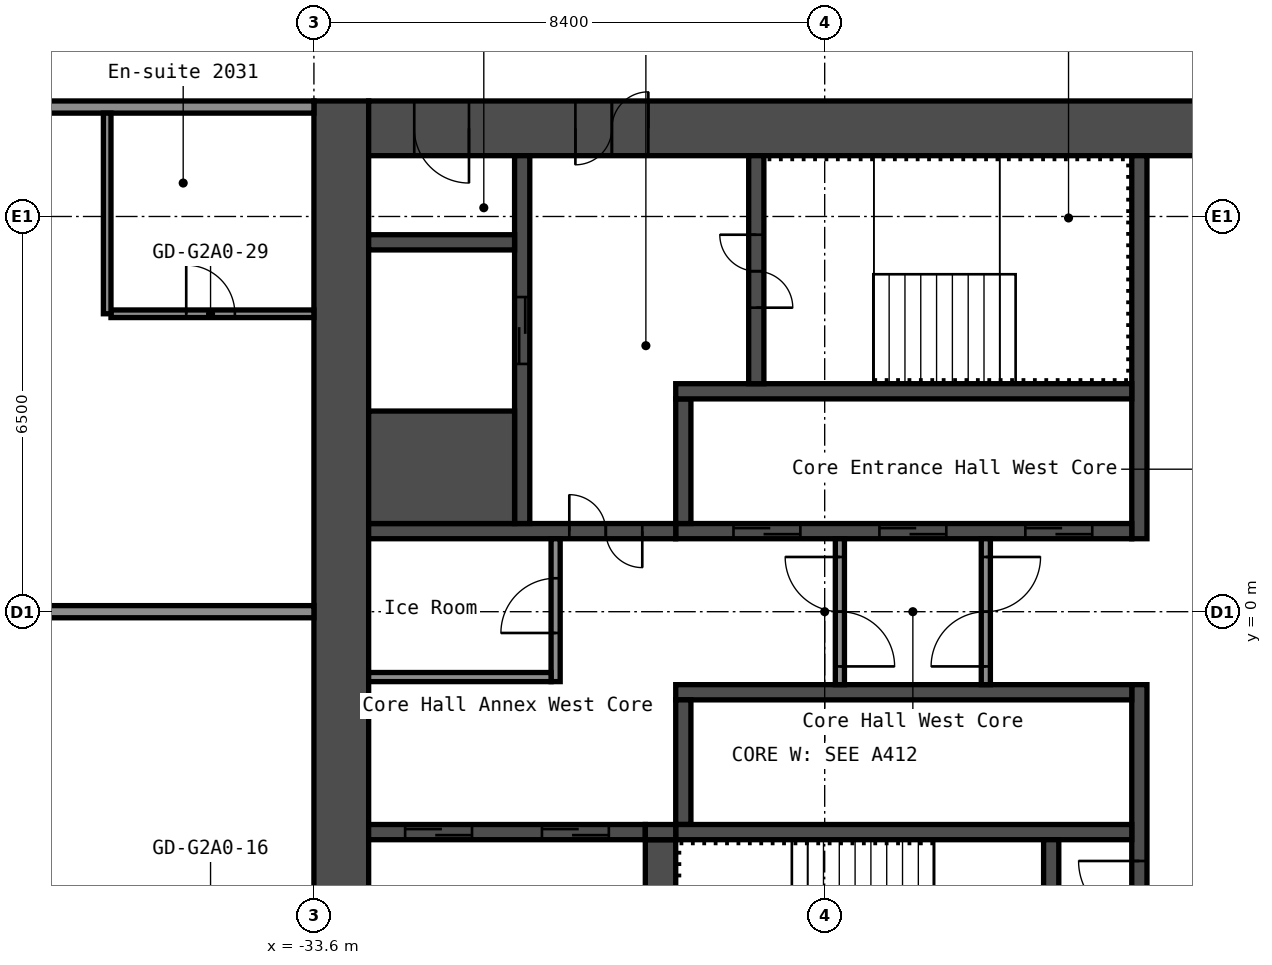
"""IFC4 building model, lengths in metres.
Left out: names, types, materials, properties, quantities, classifications, styles, units other than length and angle.
Written with IfcOpenShell. Run it as: python <this file> out.ifc"""

import sys

from ifc_helpers import new_model, si_unit, direction, frame, frame_2d, origin, place, context, subcontext, project, spatial, rectangle, extrude, element, fill, save


model = new_model("IFC4")
c1 = context("Model", 3, precision=1e-05, world=origin(), true_north=direction((0.0, 1.0)))
c2 = subcontext(c1, "Body", "Model", "MODEL_VIEW")
j1 = project(units=[si_unit("LENGTHUNIT", "METRE"), si_unit("PLANEANGLEUNIT", "RADIAN")], contexts=[c1])
p1 = place(None, origin())
s1 = spatial("IfcSite", under=j1, at=p1, CompositionType="ELEMENT")
p2 = place(p1, origin())
s2 = spatial("IfcBuilding", under=s1, at=p2, CompositionType="ELEMENT")
p3 = place(p2, frame((0.0, 0.0, 75.4)))
s3 = spatial("IfcBuildingStorey", under=s2, at=p3, CompositionType="ELEMENT", Elevation=75.4)
p4 = place(p3, frame((-33.15, -8.4, 0.0), z_axis=(0.0, 0.0, 1.0), x_axis=(0.0, 1.0, 0.0)))
e1 = element("IfcWall", 1, at=p4, inside=s3, PredefinedType="SHEAR", context=c2, shape_type="SweptSolid", body=[
    extrude(rectangle(XDim=16.8, YDim=0.9, at=frame_2d((8.4, 0.0))), origin(), (0.0, 0.0, 1.0), 2.8),
])
p5 = place(p3, frame((-32.7, 7.95, 0.0), z_axis=(0.0, 0.0, 1.0), x_axis=(1.0, 0.0, 0.0)))
e2 = element("IfcWall", 2, at=p5, inside=s3, PredefinedType="SHEAR", context=c2, shape_type="SweptSolid", body=[
    extrude(rectangle(XDim=15.0, YDim=0.9, at=frame_2d((7.5, 0.0))), origin(), (0.0, 0.0, 1.0), 2.8),
])
p6 = place(p5, frame((3.4, 0.0, 0.0)))
e3 = element("IfcOpeningElement", 3, at=p6, cuts=e2, PredefinedType="OPENING", context=c2, shape_type="SweptSolid", body=[
    extrude(rectangle(XDim=1.2, YDim=2.1, at=frame_2d((0.6, 1.05))), frame((0.0, 0.46, 0.0), z_axis=(0.0, -1.0, 0.0), x_axis=(1.0, 0.0, 0.0)), (0.0, 0.0, 1.0), 0.92),
])
p7 = place(p5, frame((0.75, 0.0, 0.0)))
e4 = element("IfcOpeningElement", 4, at=p7, cuts=e2, PredefinedType="OPENING", context=c2, shape_type="SweptSolid", body=[
    extrude(rectangle(XDim=0.9, YDim=2.1, at=frame_2d((0.45, 1.05))), frame((0.0, 0.46, 0.0), z_axis=(0.0, -1.0, 0.0), x_axis=(1.0, 0.0, 0.0)), (0.0, 0.0, 1.0), 0.92),
])
p8 = place(p3, frame((-20.025, 1.2, 0.0), z_axis=(0.0, 0.0, 1.0), x_axis=(0.0, 1.0, 0.0)))
e5 = element("IfcWall", 5, at=p8, inside=s3, PredefinedType="SHEAR", context=c2, shape_type="SweptSolid", body=[
    extrude(rectangle(XDim=6.3, YDim=0.25, at=frame_2d((3.15, 0.0))), origin(), (0.0, 0.0, 1.0), 2.8),
])
p9 = place(p3, frame((-20.025, -7.5, 0.0), z_axis=(0.0, 0.0, 1.0), x_axis=(0.0, 1.0, 0.0)))
e6 = element("IfcWall", 6, at=p9, inside=s3, PredefinedType="SHEAR", context=c2, shape_type="SweptSolid", body=[
    extrude(rectangle(XDim=6.3, YDim=0.25, at=frame_2d((3.15, 0.0))), origin(), (0.0, 0.0, 1.0), 2.8),
])
p10 = place(p9, frame((2.4, 0.0, 0.0)))
e7 = element("IfcOpeningElement", 7, at=p10, cuts=e6, PredefinedType="OPENING", context=c2, shape_type="SweptSolid", body=[
    extrude(rectangle(XDim=1.0, YDim=2.1, at=frame_2d((0.5, 1.05))), frame((0.0, 0.135, 0.0), z_axis=(0.0, -1.0, 0.0), x_axis=(1.0, 0.0, 0.0)), (0.0, 0.0, 1.0), 0.27),
])
p11 = place(p3, frame((-27.65, 1.325, 0.0), z_axis=(0.0, 0.0, 1.0), x_axis=(1.0, 0.0, 0.0)))
e8 = element("IfcWall", 8, at=p11, inside=s3, PredefinedType="SHEAR", context=c2, shape_type="SweptSolid", body=[
    extrude(rectangle(XDim=7.5, YDim=0.25, at=frame_2d((3.75, 0.0))), origin(), (0.0, 0.0, 1.0), 2.8),
])
p12 = place(p11, frame((5.75, 0.0, 0.0)))
e9 = element("IfcOpeningElement", 9, at=p12, cuts=e8, PredefinedType="OPENING", context=c2, shape_type="SweptSolid", body=[
    extrude(rectangle(XDim=1.1, YDim=2.1, at=frame_2d((0.55, 1.05))), frame((0.0, 0.135, 0.0), z_axis=(0.0, -1.0, 0.0), x_axis=(1.0, 0.0, 0.0)), (0.0, 0.0, 1.0), 0.27),
])
p13 = place(p11, frame((3.35, 0.0, 0.0)))
e10 = element("IfcOpeningElement", 10, at=p13, cuts=e8, PredefinedType="OPENING", context=c2, shape_type="SweptSolid", body=[
    extrude(rectangle(XDim=1.1, YDim=2.1, at=frame_2d((0.55, 1.05))), frame((0.0, 0.135, 0.0), z_axis=(0.0, -1.0, 0.0), x_axis=(1.0, 0.0, 0.0)), (0.0, 0.0, 1.0), 0.27),
])
p14 = place(p11, frame((0.95, 0.0, 0.0)))
e11 = element("IfcOpeningElement", 11, at=p14, cuts=e8, PredefinedType="OPENING", context=c2, shape_type="SweptSolid", body=[
    extrude(rectangle(XDim=1.1, YDim=2.1, at=frame_2d((0.55, 1.05))), frame((0.0, 0.135, 0.0), z_axis=(0.0, -1.0, 0.0), x_axis=(1.0, 0.0, 0.0)), (0.0, 0.0, 1.0), 0.27),
])
p15 = place(p3, frame((-27.525, 1.45, 0.0), z_axis=(0.0, 0.0, 1.0), x_axis=(0.0, 1.0, 0.0)))
e12 = element("IfcWall", 12, at=p15, inside=s3, PredefinedType="SHEAR", context=c2, shape_type="SweptSolid", body=[
    extrude(rectangle(XDim=2.05, YDim=0.25, at=frame_2d((1.025, 0.0))), origin(), (0.0, 0.0, 1.0), 2.8),
])
p16 = place(p3, frame((-27.65, 3.625, 0.0), z_axis=(0.0, 0.0, 1.0), x_axis=(1.0, 0.0, 0.0)))
e13 = element("IfcWall", 13, at=p16, inside=s3, PredefinedType="SHEAR", context=c2, shape_type="SweptSolid", body=[
    extrude(rectangle(XDim=7.5, YDim=0.25, at=frame_2d((3.75, 0.0))), origin(), (0.0, 0.0, 1.0), 2.8),
])
p17 = place(p3, frame((-26.325, 3.75, 0.0), z_axis=(0.0, 0.0, 1.0), x_axis=(0.0, 1.0, 0.0)))
e14 = element("IfcWall", 14, at=p17, inside=s3, PredefinedType="SHEAR", context=c2, shape_type="SweptSolid", body=[
    extrude(rectangle(XDim=3.75, YDim=0.25, at=frame_2d((1.875, 0.0))), origin(), (0.0, 0.0, 1.0), 2.8),
])
p18 = place(p17, frame((1.25, 0.0, 0.0)))
e15 = element("IfcOpeningElement", 15, at=p18, cuts=e14, PredefinedType="OPENING", context=c2, shape_type="SweptSolid", body=[
    extrude(rectangle(XDim=1.2, YDim=2.1, at=frame_2d((0.6, 1.05))), frame((0.0, 0.135, 0.0), z_axis=(0.0, -1.0, 0.0), x_axis=(1.0, 0.0, 0.0)), (0.0, 0.0, 1.0), 0.27),
])
p19 = place(p3, frame((-32.7, 1.325, 0.0), z_axis=(0.0, 0.0, 1.0), x_axis=(1.0, 0.0, 0.0)))
e16 = element("IfcWall", 16, at=p19, inside=s3, PredefinedType="SHEAR", context=c2, shape_type="SweptSolid", body=[
    extrude(rectangle(XDim=5.05, YDim=0.25, at=frame_2d((2.525, 0.0))), origin(), (0.0, 0.0, 1.0), 2.8),
])
p20 = place(p19, frame((3.3, 0.0, 0.0)))
e17 = element("IfcOpeningElement", 17, at=p20, cuts=e16, PredefinedType="OPENING", context=c2, shape_type="SweptSolid", body=[
    extrude(rectangle(XDim=1.2, YDim=2.1, at=frame_2d((0.6, 1.05))), frame((0.0, 0.135, 0.0), z_axis=(0.0, -1.0, 0.0), x_axis=(1.0, 0.0, 0.0)), (0.0, 0.0, 1.0), 0.27),
])
p21 = place(p3, frame((-30.175, 1.45, 0.0), z_axis=(0.0, 0.0, 1.0), x_axis=(0.0, 1.0, 0.0)))
e18 = element("IfcWall", 18, at=p21, inside=s3, PredefinedType="SHEAR", context=c2, shape_type="SweptSolid", body=[
    extrude(rectangle(XDim=6.05, YDim=0.25, at=frame_2d((3.025, 0.0))), origin(), (0.0, 0.0, 1.0), 2.8),
])
p22 = place(p21, frame((2.625, 0.0, 0.0)))
e19 = element("IfcOpeningElement", 19, at=p22, cuts=e18, PredefinedType="OPENING", context=c2, shape_type="SweptSolid", body=[
    extrude(rectangle(XDim=1.1, YDim=2.1, at=frame_2d((0.55, 1.05))), frame((0.0, 0.135, 0.0), z_axis=(0.0, -1.0, 0.0), x_axis=(1.0, 0.0, 0.0)), (0.0, 0.0, 1.0), 0.27),
])
p23 = place(p3, frame((-32.7, 2.375, 0.0), z_axis=(0.0, 0.0, 1.0), x_axis=(1.0, 0.0, 0.0)))
e20 = element("IfcWall", 20, at=p23, inside=s3, PredefinedType="SHEAR", context=c2, shape_type="SweptSolid", body=[
    extrude(rectangle(XDim=2.4, YDim=1.85, at=frame_2d((1.2, 0.0))), origin(), (0.0, 0.0, 1.0), 2.8),
])
p24 = place(p3, frame((-32.7, 6.075, 0.0), z_axis=(0.0, 0.0, 1.0), x_axis=(1.0, 0.0, 0.0)))
e21 = element("IfcWall", 21, at=p24, inside=s3, PredefinedType="SHEAR", context=c2, shape_type="SweptSolid", body=[
    extrude(rectangle(XDim=2.4, YDim=0.25, at=frame_2d((1.2, 0.0))), origin(), (0.0, 0.0, 1.0), 2.8),
])
p25 = place(p3, frame((-27.65, -1.325, 0.0), z_axis=(0.0, 0.0, 1.0), x_axis=(1.0, 0.0, 0.0)))
e22 = element("IfcWall", 22, at=p25, inside=s3, PredefinedType="SHEAR", context=c2, shape_type="SweptSolid", body=[
    extrude(rectangle(XDim=7.5, YDim=0.25, at=frame_2d((3.75, 0.0))), origin(), (0.0, 0.0, 1.0), 2.8),
])
p26 = place(p3, frame((-27.525, -3.5, 0.0), z_axis=(0.0, 0.0, 1.0), x_axis=(0.0, 1.0, 0.0)))
e23 = element("IfcWall", 23, at=p26, inside=s3, PredefinedType="SHEAR", context=c2, shape_type="SweptSolid", body=[
    extrude(rectangle(XDim=2.05, YDim=0.25, at=frame_2d((1.025, 0.0))), origin(), (0.0, 0.0, 1.0), 2.8),
])
p27 = place(p3, frame((-27.65, -3.625, 0.0), z_axis=(0.0, 0.0, 1.0), x_axis=(1.0, 0.0, 0.0)))
e24 = element("IfcWall", 24, at=p27, inside=s3, PredefinedType="SHEAR", context=c2, shape_type="SweptSolid", body=[
    extrude(rectangle(XDim=7.5, YDim=0.25, at=frame_2d((3.75, 0.0))), origin(), (0.0, 0.0, 1.0), 2.8),
])
p28 = place(p3, frame((-21.475, -7.5, 0.0), z_axis=(0.0, 0.0, 1.0), x_axis=(0.0, 1.0, 0.0)))
e25 = element("IfcWall", 25, at=p28, inside=s3, PredefinedType="SHEAR", context=c2, shape_type="SweptSolid", body=[
    extrude(rectangle(XDim=3.75, YDim=0.25, at=frame_2d((1.875, 0.0))), origin(), (0.0, 0.0, 1.0), 2.8),
])
p29 = place(p28, frame((1.3, 0.0, 0.0)))
e26 = element("IfcOpeningElement", 26, at=p29, cuts=e25, PredefinedType="OPENING", context=c2, shape_type="SweptSolid", body=[
    extrude(rectangle(XDim=1.2, YDim=2.1, at=frame_2d((0.6, 1.05))), frame((0.0, 0.135, 0.0), z_axis=(0.0, -1.0, 0.0), x_axis=(1.0, 0.0, 0.0)), (0.0, 0.0, 1.0), 0.27),
])
p30 = place(p3, frame((-27.9, -7.5, 0.0), z_axis=(0.0, 0.0, 1.0), x_axis=(0.0, 1.0, 0.0)))
e27 = element("IfcWall", 27, at=p30, inside=s3, PredefinedType="SHEAR", context=c2, shape_type="SweptSolid", body=[
    extrude(rectangle(XDim=3.75, YDim=0.5, at=frame_2d((1.875, 0.0))), origin(), (0.0, 0.0, 1.0), 2.8),
])
p31 = place(p3, frame((-32.7, -3.625, 0.0), z_axis=(0.0, 0.0, 1.0), x_axis=(1.0, 0.0, 0.0)))
e28 = element("IfcWall", 28, at=p31, inside=s3, PredefinedType="SHEAR", context=c2, shape_type="SweptSolid", body=[
    extrude(rectangle(XDim=4.55, YDim=0.25, at=frame_2d((2.275, 0.0))), origin(), (0.0, 0.0, 1.0), 2.8),
])
p32 = place(p31, frame((2.85, 0.0, 0.0)))
e29 = element("IfcOpeningElement", 29, at=p32, cuts=e28, PredefinedType="OPENING", context=c2, shape_type="SweptSolid", body=[
    extrude(rectangle(XDim=1.1, YDim=2.1, at=frame_2d((0.55, 1.05))), frame((0.0, 0.135, 0.0), z_axis=(0.0, -1.0, 0.0), x_axis=(1.0, 0.0, 0.0)), (0.0, 0.0, 1.0), 0.27),
])
p33 = place(p31, frame((0.6, 0.0, 0.0)))
e30 = element("IfcOpeningElement", 30, at=p33, cuts=e28, PredefinedType="OPENING", context=c2, shape_type="SweptSolid", body=[
    extrude(rectangle(XDim=1.1, YDim=2.1, at=frame_2d((0.55, 1.05))), frame((0.0, 0.135, 0.0), z_axis=(0.0, -1.0, 0.0), x_axis=(1.0, 0.0, 0.0)), (0.0, 0.0, 1.0), 0.27),
])
p34 = place(p3, frame((-28.15, -3.625, 0.0), z_axis=(0.0, 0.0, 1.0), x_axis=(1.0, 0.0, 0.0)))
e31 = element("IfcWall", 31, at=p34, inside=s3, PredefinedType="SHEAR", context=c2, shape_type="SweptSolid", body=[
    extrude(rectangle(XDim=0.5, YDim=0.25, at=frame_2d((0.25, 0.0))), origin(), (0.0, 0.0, 1.0), 2.8),
])
p35 = place(p3, frame((-22.55, -1.2, 0.0), z_axis=(0.0, 0.0, 1.0), x_axis=(0.0, 1.0, 0.0)))
e32 = element("IfcWall", 32, at=p35, inside=s3, PredefinedType="PARTITIONING", context=c2, shape_type="SweptSolid", body=[
    extrude(rectangle(XDim=2.4, YDim=0.15, at=frame_2d((1.2, 0.0))), origin(), (0.0, 0.0, 1.0), 2.8),
])
p36 = place(p35, frame((0.3, 0.0, 0.0)))
e33 = element("IfcOpeningElement", 33, at=p36, cuts=e32, PredefinedType="OPENING", context=c2, shape_type="SweptSolid", body=[
    extrude(rectangle(XDim=1.8, YDim=2.1, at=frame_2d((0.9, 1.05))), frame((0.0, 0.085, 0.0), z_axis=(0.0, -1.0, 0.0), x_axis=(1.0, 0.0, 0.0)), (0.0, 0.0, 1.0), 0.17),
])
p37 = place(p3, frame((-24.95, -1.2, 0.0), z_axis=(0.0, 0.0, 1.0), x_axis=(0.0, 1.0, 0.0)))
e34 = element("IfcWall", 34, at=p37, inside=s3, PredefinedType="PARTITIONING", context=c2, shape_type="SweptSolid", body=[
    extrude(rectangle(XDim=2.4, YDim=0.15, at=frame_2d((1.2, 0.0))), origin(), (0.0, 0.0, 1.0), 2.8),
])
p38 = place(p37, frame((0.3, 0.0, 0.0)))
e35 = element("IfcOpeningElement", 35, at=p38, cuts=e34, PredefinedType="OPENING", context=c2, shape_type="SweptSolid", body=[
    extrude(rectangle(XDim=1.8, YDim=2.1, at=frame_2d((0.9, 1.05))), frame((0.0, 0.085, 0.0), z_axis=(0.0, -1.0, 0.0), x_axis=(1.0, 0.0, 0.0)), (0.0, 0.0, 1.0), 0.17),
])
p39 = place(p3, frame((-29.625, -1.15, 0.0), z_axis=(0.0, 0.0, 1.0), x_axis=(0.0, 1.0, 0.0)))
e36 = element("IfcWall", 36, at=p39, inside=s3, PredefinedType="PARTITIONING", context=c2, shape_type="SweptSolid", body=[
    extrude(rectangle(XDim=2.35, YDim=0.15, at=frame_2d((1.175, 0.0))), origin(), (0.0, 0.0, 1.0), 2.8),
])
p40 = place(p39, frame((0.8, 0.0, 0.0)))
e37 = element("IfcOpeningElement", 37, at=p40, cuts=e36, PredefinedType="OPENING", context=c2, shape_type="SweptSolid", body=[
    extrude(rectangle(XDim=0.9, YDim=2.1, at=frame_2d((0.45, 1.05))), frame((0.0, 0.085, 0.0), z_axis=(0.0, -1.0, 0.0), x_axis=(1.0, 0.0, 0.0)), (0.0, 0.0, 1.0), 0.17),
])
p41 = place(p3, frame((-32.7, -1.075, 0.0), z_axis=(0.0, 0.0, 1.0), x_axis=(1.0, 0.0, 0.0)))
e38 = element("IfcWall", 38, at=p41, inside=s3, PredefinedType="PARTITIONING", context=c2, shape_type="SweptSolid", body=[
    extrude(rectangle(XDim=3.0, YDim=0.15, at=frame_2d((1.5, 0.0))), origin(), (0.0, 0.0, 1.0), 2.8),
])
p42 = place(p3, frame((-43.9, 0.0, 0.0), z_axis=(0.0, 0.0, 1.0), x_axis=(1.0, 0.0, 0.0)))
e39 = element("IfcWall", 39, at=p42, inside=s3, PredefinedType="PARTITIONING", context=c2, shape_type="SweptSolid", body=[
    extrude(rectangle(XDim=10.3, YDim=0.2, at=frame_2d((5.15, 0.0))), origin(), (0.0, 0.0, 1.0), 2.8),
])
p43 = place(p3, frame((-36.938, 4.9, 0.0), z_axis=(0.0, 0.0, 1.0), x_axis=(1.0, 0.0, 0.0)))
e40 = element("IfcWall", 40, at=p43, inside=s3, PredefinedType="PARTITIONING", context=c2, shape_type="SweptSolid", body=[
    extrude(rectangle(XDim=3.337, YDim=0.125, at=frame_2d((1.669, 0.0))), origin(), (0.0, 0.0, 1.0), 2.8),
])
p44 = place(p43, frame((1.238, 0.0, 0.0)))
e41 = element("IfcOpeningElement", 41, at=p44, cuts=e40, PredefinedType="OPENING", context=c2, shape_type="SweptSolid", body=[
    extrude(rectangle(XDim=0.8, YDim=2.1, at=frame_2d((0.4, 1.05))), frame((0.0, 0.073, 0.0), z_axis=(0.0, -1.0, 0.0), x_axis=(1.0, 0.0, 0.0)), (0.0, 0.0, 1.0), 0.145),
])
p45 = place(p3, frame((-44.0, 8.3, 0.0), z_axis=(0.0, 0.0, 1.0), x_axis=(1.0, 0.0, 0.0)))
e42 = element("IfcWall", 42, at=p45, inside=s3, PredefinedType="PARTITIONING", context=c2, shape_type="SweptSolid", body=[
    extrude(rectangle(XDim=10.4, YDim=0.2, at=frame_2d((5.2, 0.0))), origin(), (0.0, 0.0, 1.0), 2.8),
])
p46 = place(p45, frame((3.05, 0.0, 0.0)))
e43 = element("IfcOpeningElement", 43, at=p46, cuts=e42, PredefinedType="OPENING", context=c2, shape_type="SweptSolid", body=[
    extrude(rectangle(XDim=1.0, YDim=2.1, at=frame_2d((0.5, 1.05))), frame((0.0, 0.11, 0.0), z_axis=(0.0, -1.0, 0.0), x_axis=(1.0, 0.0, 0.0)), (0.0, 0.0, 1.0), 0.22),
])
p47 = place(p3, frame((-37.0, 4.9, 0.0), z_axis=(0.0, 0.0, 1.0), x_axis=(0.0, 1.0, 0.0)))
e44 = element("IfcWall", 44, at=p47, inside=s3, PredefinedType="PARTITIONING", context=c2, shape_type="SweptSolid", body=[
    extrude(rectangle(XDim=3.3, YDim=0.125, at=frame_2d((1.65, 0.0))), origin(), (0.0, 0.0, 1.0), 2.8),
])
p48 = place(p6, origin())
e45 = element("IfcDoor", 45, at=p48, inside=s3, OperationType="DOUBLE_DOOR_SINGLE_SWING", PredefinedType="DOOR", context=c2, shape_type="SweptSolid", body=[
    extrude(rectangle(XDim=1.2, YDim=2.1, at=frame_2d((0.6, 1.05))), frame((0.0, 0.025, 0.0), z_axis=(0.0, -1.0, 0.0), x_axis=(1.0, 0.0, 0.0)), (0.0, 0.0, 1.0), 0.05),
])
fill(e3, e45)
p49 = place(p7, origin())
e46 = element("IfcDoor", 46, at=p49, inside=s3, OperationType="SINGLE_SWING_RIGHT", PredefinedType="DOOR", context=c2, shape_type="SweptSolid", body=[
    extrude(rectangle(XDim=0.9, YDim=2.1, at=frame_2d((0.45, 1.05))), frame((0.0, 0.025, 0.0), z_axis=(0.0, -1.0, 0.0), x_axis=(1.0, 0.0, 0.0)), (0.0, 0.0, 1.0), 0.05),
])
fill(e4, e46)
p50 = place(p18, origin())
e47 = element("IfcDoor", 47, at=p50, inside=s3, OperationType="DOUBLE_DOOR_SINGLE_SWING", PredefinedType="DOOR", context=c2, shape_type="SweptSolid", body=[
    extrude(rectangle(XDim=1.2, YDim=2.1, at=frame_2d((0.6, 1.05))), frame((0.0, 0.025, 0.0), z_axis=(0.0, -1.0, 0.0), x_axis=(1.0, 0.0, 0.0)), (0.0, 0.0, 1.0), 0.05),
])
fill(e15, e47)
p51 = place(p10, origin())
e48 = element("IfcDoor", 48, at=p51, inside=s3, OperationType="SINGLE_SWING_LEFT", PredefinedType="DOOR", context=c2, shape_type="SweptSolid", body=[
    extrude(rectangle(XDim=1.0, YDim=2.1, at=frame_2d((0.5, 1.05))), frame((0.0, 0.025, 0.0), z_axis=(0.0, -1.0, 0.0), x_axis=(1.0, 0.0, 0.0)), (0.0, 0.0, 1.0), 0.05),
])
fill(e7, e48)
p52 = place(p20, origin())
e49 = element("IfcDoor", 49, at=p52, inside=s3, OperationType="DOUBLE_DOOR_SINGLE_SWING", PredefinedType="DOOR", context=c2, shape_type="SweptSolid", body=[
    extrude(rectangle(XDim=1.2, YDim=2.1, at=frame_2d((0.6, 1.05))), frame((0.0, 0.025, 0.0), z_axis=(0.0, -1.0, 0.0), x_axis=(1.0, 0.0, 0.0)), (0.0, 0.0, 1.0), 0.05),
])
fill(e17, e49)
p53 = place(p36, origin())
e50 = element("IfcDoor", 50, at=p53, inside=s3, OperationType="DOUBLE_DOOR_SINGLE_SWING", PredefinedType="DOOR", context=c2, shape_type="SweptSolid", body=[
    extrude(rectangle(XDim=1.8, YDim=2.1, at=frame_2d((0.9, 1.05))), frame((0.0, 0.025, 0.0), z_axis=(0.0, -1.0, 0.0), x_axis=(1.0, 0.0, 0.0)), (0.0, 0.0, 1.0), 0.05),
])
fill(e33, e50)
p54 = place(p38, origin())
e51 = element("IfcDoor", 51, at=p54, inside=s3, OperationType="DOUBLE_DOOR_SINGLE_SWING", PredefinedType="DOOR", context=c2, shape_type="SweptSolid", body=[
    extrude(rectangle(XDim=1.8, YDim=2.1, at=frame_2d((0.9, 1.05))), frame((0.0, 0.025, 0.0), z_axis=(0.0, -1.0, 0.0), x_axis=(1.0, 0.0, 0.0)), (0.0, 0.0, 1.0), 0.05),
])
fill(e35, e51)
p55 = place(p40, origin())
e52 = element("IfcDoor", 52, at=p55, inside=s3, OperationType="SINGLE_SWING_RIGHT", PredefinedType="DOOR", context=c2, shape_type="SweptSolid", body=[
    extrude(rectangle(XDim=0.9, YDim=2.1, at=frame_2d((0.45, 1.05))), frame((0.0, 0.025, 0.0), z_axis=(0.0, -1.0, 0.0), x_axis=(1.0, 0.0, 0.0)), (0.0, 0.0, 1.0), 0.05),
])
fill(e37, e52)
p56 = place(p12, origin())
e53 = element("IfcDoor", 53, at=p56, inside=s3, OperationType="DOUBLE_DOOR_SLIDING", PredefinedType="DOOR", context=c2, shape_type="SweptSolid", body=[
    extrude(rectangle(XDim=1.1, YDim=2.1, at=frame_2d((0.55, 1.05))), frame((0.0, 0.025, 0.0), z_axis=(0.0, -1.0, 0.0), x_axis=(1.0, 0.0, 0.0)), (0.0, 0.0, 1.0), 0.05),
])
fill(e9, e53)
p57 = place(p13, origin())
e54 = element("IfcDoor", 54, at=p57, inside=s3, OperationType="DOUBLE_DOOR_SLIDING", PredefinedType="DOOR", context=c2, shape_type="SweptSolid", body=[
    extrude(rectangle(XDim=1.1, YDim=2.1, at=frame_2d((0.55, 1.05))), frame((0.0, 0.025, 0.0), z_axis=(0.0, -1.0, 0.0), x_axis=(1.0, 0.0, 0.0)), (0.0, 0.0, 1.0), 0.05),
])
fill(e10, e54)
p58 = place(p14, origin())
e55 = element("IfcDoor", 55, at=p58, inside=s3, OperationType="DOUBLE_DOOR_SLIDING", PredefinedType="DOOR", context=c2, shape_type="SweptSolid", body=[
    extrude(rectangle(XDim=1.1, YDim=2.1, at=frame_2d((0.55, 1.05))), frame((0.0, 0.025, 0.0), z_axis=(0.0, -1.0, 0.0), x_axis=(1.0, 0.0, 0.0)), (0.0, 0.0, 1.0), 0.05),
])
fill(e11, e55)
p59 = place(p22, origin())
e56 = element("IfcDoor", 56, at=p59, inside=s3, OperationType="DOUBLE_DOOR_SLIDING", PredefinedType="DOOR", context=c2, shape_type="SweptSolid", body=[
    extrude(rectangle(XDim=1.1, YDim=2.1, at=frame_2d((0.55, 1.05))), frame((0.0, 0.025, 0.0), z_axis=(0.0, -1.0, 0.0), x_axis=(1.0, 0.0, 0.0)), (0.0, 0.0, 1.0), 0.05),
])
fill(e19, e56)
p60 = place(p32, origin())
e57 = element("IfcDoor", 57, at=p60, inside=s3, OperationType="DOUBLE_DOOR_SLIDING", PredefinedType="DOOR", context=c2, shape_type="SweptSolid", body=[
    extrude(rectangle(XDim=1.1, YDim=2.1, at=frame_2d((0.55, 1.05))), frame((0.0, 0.025, 0.0), z_axis=(0.0, -1.0, 0.0), x_axis=(1.0, 0.0, 0.0)), (0.0, 0.0, 1.0), 0.05),
])
fill(e29, e57)
p61 = place(p33, origin())
e58 = element("IfcDoor", 58, at=p61, inside=s3, OperationType="DOUBLE_DOOR_SLIDING", PredefinedType="DOOR", context=c2, shape_type="SweptSolid", body=[
    extrude(rectangle(XDim=1.1, YDim=2.1, at=frame_2d((0.55, 1.05))), frame((0.0, 0.025, 0.0), z_axis=(0.0, -1.0, 0.0), x_axis=(1.0, 0.0, 0.0)), (0.0, 0.0, 1.0), 0.05),
])
fill(e30, e58)
p62 = place(p44, origin())
e59 = element("IfcDoor", 59, at=p62, inside=s3, OperationType="SINGLE_SWING_RIGHT", PredefinedType="DOOR", context=c2, shape_type="SweptSolid", body=[
    extrude(rectangle(XDim=0.8, YDim=2.1, at=frame_2d((0.4, 1.05))), frame((0.0, 0.025, 0.0), z_axis=(0.0, -1.0, 0.0), x_axis=(1.0, 0.0, 0.0)), (0.0, 0.0, 1.0), 0.05),
])
fill(e41, e59)
save(model, sys.argv[1])
